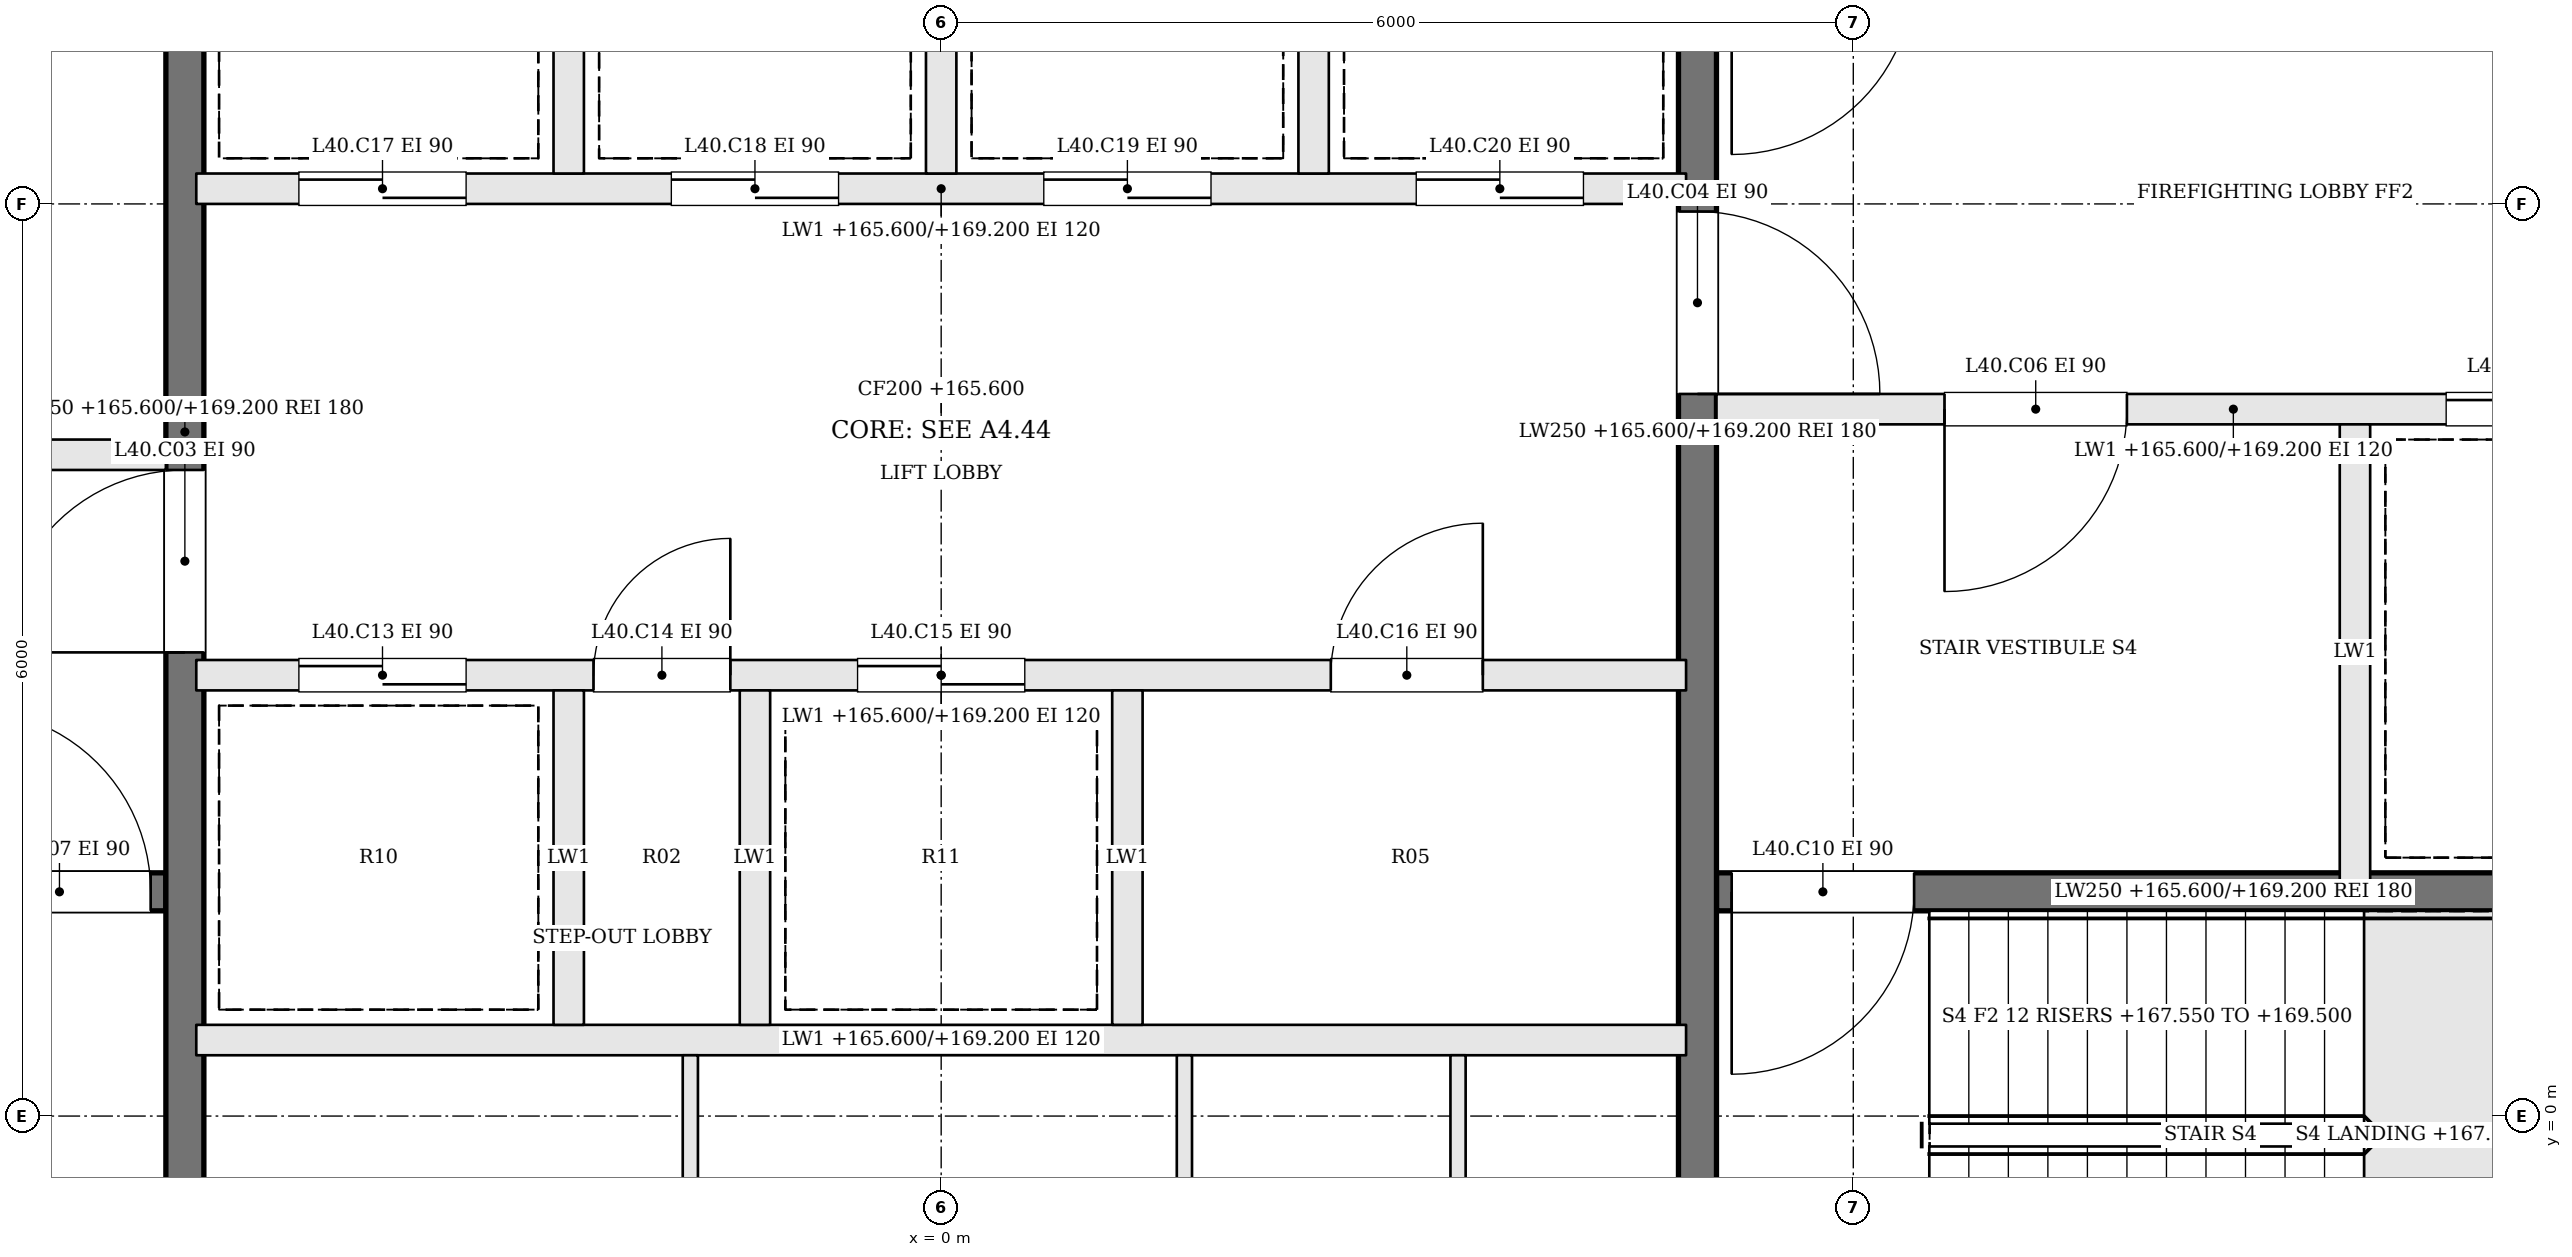
"""IFC4 building model, lengths in metres.
Left out: names, types, materials, properties, quantities, classifications, styles, units other than length and angle.
Written with IfcOpenShell. Run it as: python <this file> out.ifc"""

import sys

from ifc_helpers import new_model, si_unit, direction, frame, frame_2d, origin, place, context, subcontext, project, spatial, rectangle, extrude, element, fill, save


model = new_model("IFC4")
c1 = context("Model", 3, precision=1e-05, world=origin(), true_north=direction((0.0, 1.0)))
c2 = subcontext(c1, "Body", "Model", "MODEL_VIEW")
j1 = project(units=[si_unit("LENGTHUNIT", "METRE"), si_unit("PLANEANGLEUNIT", "RADIAN")], contexts=[c1])
p1 = place(None, origin())
s1 = spatial("IfcSite", under=j1, at=p1, CompositionType="ELEMENT")
p2 = place(p1, origin())
s2 = spatial("IfcBuilding", under=s1, at=p2, CompositionType="ELEMENT")
p3 = place(p2, frame((0.0, 0.0, 165.6)))
s3 = spatial("IfcBuildingStorey", under=s2, at=p3, CompositionType="ELEMENT", Elevation=165.6)
p4 = place(p3, frame((-11.9, 1.475, 0.0), z_axis=(0.0, 0.0, 1.0), x_axis=(1.0, 0.0, 0.0)))
e1 = element("IfcWall", 1, at=p4, inside=s3, PredefinedType="SOLIDWALL", context=c2, shape_type="SweptSolid", body=[
    extrude(rectangle(XDim=6.8, YDim=0.25, at=frame_2d((3.4, 0.0))), origin(), (0.0, 0.0, 1.0), 3.6),
])
p5 = place(p4, frame((5.5, 0.0, 0.0)))
e2 = element("IfcOpeningElement", 2, at=p5, cuts=e1, PredefinedType="OPENING", context=c2, shape_type="SweptSolid", body=[
    extrude(rectangle(XDim=1.2, YDim=2.1, at=frame_2d((0.6, 1.05))), frame((0.0, 0.135, 0.0), z_axis=(0.0, -1.0, 0.0), x_axis=(1.0, 0.0, 0.0)), (0.0, 0.0, 1.0), 0.27),
])
p6 = place(p3, frame((-11.9, 4.35, 0.0), z_axis=(0.0, 0.0, 1.0), x_axis=(1.0, 0.0, 0.0)))
e3 = element("IfcWall", 3, at=p6, inside=s3, PredefinedType="SOLIDWALL", context=c2, shape_type="SweptSolid", body=[
    extrude(rectangle(XDim=6.8, YDim=0.2, at=frame_2d((3.4, 0.0))), origin(), (0.0, 0.0, 1.0), 3.6),
])
p7 = place(p6, frame((4.1, 0.0, 0.0)))
e4 = element("IfcOpeningElement", 4, at=p7, cuts=e3, PredefinedType="OPENING", context=c2, shape_type="SweptSolid", body=[
    extrude(rectangle(XDim=1.2, YDim=2.1, at=frame_2d((0.6, 1.05))), frame((0.0, 0.11, 0.0), z_axis=(0.0, -1.0, 0.0), x_axis=(1.0, 0.0, 0.0)), (0.0, 0.0, 1.0), 0.22),
])
p8 = place(p6, frame((0.8, 0.0, 0.0)))
e5 = element("IfcOpeningElement", 5, at=p8, cuts=e3, PredefinedType="OPENING", context=c2, shape_type="SweptSolid", body=[
    extrude(rectangle(XDim=1.2, YDim=2.1, at=frame_2d((0.6, 1.05))), frame((0.0, 0.11, 0.0), z_axis=(0.0, -1.0, 0.0), x_axis=(1.0, 0.0, 0.0)), (0.0, 0.0, 1.0), 0.22),
])
p9 = place(p3, frame((11.9, 4.65, 0.0), z_axis=(0.0, 0.0, 1.0), x_axis=(-1.0, 0.0, 0.0)))
e6 = element("IfcWall", 6, at=p9, inside=s3, PredefinedType="SOLIDWALL", context=c2, shape_type="SweptSolid", body=[
    extrude(rectangle(XDim=6.8, YDim=0.2, at=frame_2d((3.4, 0.0))), origin(), (0.0, 0.0, 1.0), 3.6),
])
p10 = place(p9, frame((4.1, 0.0, 0.0)))
e7 = element("IfcOpeningElement", 7, at=p10, cuts=e6, PredefinedType="OPENING", context=c2, shape_type="SweptSolid", body=[
    extrude(rectangle(XDim=1.2, YDim=2.1, at=frame_2d((0.6, 1.05))), frame((0.0, 0.11, 0.0), z_axis=(0.0, -1.0, 0.0), x_axis=(1.0, 0.0, 0.0)), (0.0, 0.0, 1.0), 0.22),
])
p11 = place(p9, frame((0.8, 0.0, 0.0)))
e8 = element("IfcOpeningElement", 8, at=p11, cuts=e6, PredefinedType="OPENING", context=c2, shape_type="SweptSolid", body=[
    extrude(rectangle(XDim=1.2, YDim=2.1, at=frame_2d((0.6, 1.05))), frame((0.0, 0.11, 0.0), z_axis=(0.0, -1.0, 0.0), x_axis=(1.0, 0.0, 0.0)), (0.0, 0.0, 1.0), 0.22),
])
p12 = place(p3, frame((11.9, 1.475, 0.0), z_axis=(0.0, 0.0, 1.0), x_axis=(-1.0, 0.0, 0.0)))
e9 = element("IfcWall", 9, at=p12, inside=s3, PredefinedType="SOLIDWALL", context=c2, shape_type="SweptSolid", body=[
    extrude(rectangle(XDim=6.8, YDim=0.25, at=frame_2d((3.4, 0.0))), origin(), (0.0, 0.0, 1.0), 3.6),
])
p13 = place(p12, frame((5.5, 0.0, 0.0)))
e10 = element("IfcOpeningElement", 10, at=p13, cuts=e9, PredefinedType="OPENING", context=c2, shape_type="SweptSolid", body=[
    extrude(rectangle(XDim=1.2, YDim=2.1, at=frame_2d((0.6, 1.05))), frame((0.0, 0.135, 0.0), z_axis=(0.0, -1.0, 0.0), x_axis=(1.0, 0.0, 0.0)), (0.0, 0.0, 1.0), 0.27),
])
p14 = place(p3, frame((9.3, 4.55, 0.0), z_axis=(0.0, 0.0, 1.0), x_axis=(0.0, -1.0, 0.0)))
e11 = element("IfcWall", 11, at=p14, inside=s3, PredefinedType="SOLIDWALL", context=c2, shape_type="SweptSolid", body=[
    extrude(rectangle(XDim=3.0, YDim=0.2, at=frame_2d((1.5, 0.0))), origin(), (0.0, 0.0, 1.0), 3.6),
])
p15 = place(p3, frame((-4.975, -1.9, 0.0), z_axis=(0.0, 0.0, 1.0), x_axis=(0.0, 1.0, 0.0)))
e12 = element("IfcWall", 12, at=p15, inside=s3, PredefinedType="SOLIDWALL", context=c2, shape_type="SweptSolid", body=[
    extrude(rectangle(XDim=12.8, YDim=0.25, at=frame_2d((6.4, 0.0))), origin(), (0.0, 0.0, 1.0), 3.6),
])
p16 = place(p15, frame((4.95, 0.0, 0.0)))
e13 = element("IfcOpeningElement", 13, at=p16, cuts=e12, PredefinedType="OPENING", context=c2, shape_type="SweptSolid", body=[
    extrude(rectangle(XDim=1.2, YDim=2.1, at=frame_2d((0.6, 1.05))), frame((0.0, 0.135, 0.0), z_axis=(0.0, -1.0, 0.0), x_axis=(1.0, 0.0, 0.0)), (0.0, 0.0, 1.0), 0.27),
])
p17 = place(p3, frame((4.975, 10.9, 0.0), z_axis=(0.0, 0.0, 1.0), x_axis=(0.0, -1.0, 0.0)))
e14 = element("IfcWall", 14, at=p17, inside=s3, PredefinedType="SOLIDWALL", context=c2, shape_type="SweptSolid", body=[
    extrude(rectangle(XDim=12.8, YDim=0.25, at=frame_2d((6.4, 0.0))), origin(), (0.0, 0.0, 1.0), 3.6),
])
p18 = place(p17, frame((4.95, 0.0, 0.0)))
e15 = element("IfcOpeningElement", 15, at=p18, cuts=e14, PredefinedType="OPENING", context=c2, shape_type="SweptSolid", body=[
    extrude(rectangle(XDim=1.2, YDim=2.1, at=frame_2d((0.6, 1.05))), frame((0.0, 0.135, 0.0), z_axis=(0.0, -1.0, 0.0), x_axis=(1.0, 0.0, 0.0)), (0.0, 0.0, 1.0), 0.27),
])
p19 = place(p3, frame((-4.9, 0.5, 0.0), z_axis=(0.0, 0.0, 1.0), x_axis=(1.0, 0.0, 0.0)))
e16 = element("IfcWall", 16, at=p19, inside=s3, PredefinedType="SOLIDWALL", context=c2, shape_type="SweptSolid", body=[
    extrude(rectangle(XDim=9.8, YDim=0.2, at=frame_2d((4.9, 0.0))), origin(), (0.0, 0.0, 1.0), 3.6),
])
p20 = place(p3, frame((-4.9, 2.9, 0.0), z_axis=(0.0, 0.0, 1.0), x_axis=(1.0, 0.0, 0.0)))
e17 = element("IfcWall", 17, at=p20, inside=s3, PredefinedType="SOLIDWALL", context=c2, shape_type="SweptSolid", body=[
    extrude(rectangle(XDim=9.8, YDim=0.2, at=frame_2d((4.9, 0.0))), origin(), (0.0, 0.0, 1.0), 3.6),
])
p21 = place(p20, frame((0.675, 0.0, 0.0)))
e18 = element("IfcOpeningElement", 18, at=p21, cuts=e17, PredefinedType="OPENING", context=c2, shape_type="SweptSolid", body=[
    extrude(rectangle(XDim=1.1, YDim=2.1, at=frame_2d((0.55, 1.05))), frame((0.0, 0.11, 0.0), z_axis=(0.0, -1.0, 0.0), x_axis=(1.0, 0.0, 0.0)), (0.0, 0.0, 1.0), 0.22),
])
p22 = place(p20, frame((2.613, 0.0, 0.0)))
e19 = element("IfcOpeningElement", 19, at=p22, cuts=e17, PredefinedType="OPENING", context=c2, shape_type="SweptSolid", body=[
    extrude(rectangle(XDim=0.9, YDim=2.1, at=frame_2d((0.45, 1.05))), frame((0.0, 0.11, 0.0), z_axis=(0.0, -1.0, 0.0), x_axis=(1.0, 0.0, 0.0)), (0.0, 0.0, 1.0), 0.22),
])
p23 = place(p20, frame((4.35, 0.0, 0.0)))
e20 = element("IfcOpeningElement", 20, at=p23, cuts=e17, PredefinedType="OPENING", context=c2, shape_type="SweptSolid", body=[
    extrude(rectangle(XDim=1.1, YDim=2.1, at=frame_2d((0.55, 1.05))), frame((0.0, 0.11, 0.0), z_axis=(0.0, -1.0, 0.0), x_axis=(1.0, 0.0, 0.0)), (0.0, 0.0, 1.0), 0.22),
])
p24 = place(p20, frame((7.463, 0.0, 0.0)))
e21 = element("IfcOpeningElement", 21, at=p24, cuts=e17, PredefinedType="OPENING", context=c2, shape_type="SweptSolid", body=[
    extrude(rectangle(XDim=1.0, YDim=2.1, at=frame_2d((0.5, 1.05))), frame((0.0, 0.11, 0.0), z_axis=(0.0, -1.0, 0.0), x_axis=(1.0, 0.0, 0.0)), (0.0, 0.0, 1.0), 0.22),
])
p25 = place(p3, frame((-4.9, 6.1, 0.0), z_axis=(0.0, 0.0, 1.0), x_axis=(1.0, 0.0, 0.0)))
e22 = element("IfcWall", 22, at=p25, inside=s3, PredefinedType="SOLIDWALL", context=c2, shape_type="SweptSolid", body=[
    extrude(rectangle(XDim=9.8, YDim=0.2, at=frame_2d((4.9, 0.0))), origin(), (0.0, 0.0, 1.0), 3.6),
])
p26 = place(p25, frame((0.675, 0.0, 0.0)))
e23 = element("IfcOpeningElement", 23, at=p26, cuts=e22, PredefinedType="OPENING", context=c2, shape_type="SweptSolid", body=[
    extrude(rectangle(XDim=1.1, YDim=2.1, at=frame_2d((0.55, 1.05))), frame((0.0, 0.11, 0.0), z_axis=(0.0, -1.0, 0.0), x_axis=(1.0, 0.0, 0.0)), (0.0, 0.0, 1.0), 0.22),
])
p27 = place(p25, frame((3.125, 0.0, 0.0)))
e24 = element("IfcOpeningElement", 24, at=p27, cuts=e22, PredefinedType="OPENING", context=c2, shape_type="SweptSolid", body=[
    extrude(rectangle(XDim=1.1, YDim=2.1, at=frame_2d((0.55, 1.05))), frame((0.0, 0.11, 0.0), z_axis=(0.0, -1.0, 0.0), x_axis=(1.0, 0.0, 0.0)), (0.0, 0.0, 1.0), 0.22),
])
p28 = place(p25, frame((5.575, 0.0, 0.0)))
e25 = element("IfcOpeningElement", 25, at=p28, cuts=e22, PredefinedType="OPENING", context=c2, shape_type="SweptSolid", body=[
    extrude(rectangle(XDim=1.1, YDim=2.1, at=frame_2d((0.55, 1.05))), frame((0.0, 0.11, 0.0), z_axis=(0.0, -1.0, 0.0), x_axis=(1.0, 0.0, 0.0)), (0.0, 0.0, 1.0), 0.22),
])
p29 = place(p25, frame((8.025, 0.0, 0.0)))
e26 = element("IfcOpeningElement", 26, at=p29, cuts=e22, PredefinedType="OPENING", context=c2, shape_type="SweptSolid", body=[
    extrude(rectangle(XDim=1.1, YDim=2.1, at=frame_2d((0.55, 1.05))), frame((0.0, 0.11, 0.0), z_axis=(0.0, -1.0, 0.0), x_axis=(1.0, 0.0, 0.0)), (0.0, 0.0, 1.0), 0.22),
])
for number, where, z_axis, x_axis in (
    (27, (-2.45, 0.6, 0.0), (0.0, 0.0, 1.0), (0.0, 1.0, 0.0)),
    (28, (-1.225, 0.6, 0.0), (0.0, 0.0, 1.0), (0.0, 1.0, 0.0)),
    (29, (1.225, 0.6, 0.0), (0.0, 0.0, 1.0), (0.0, 1.0, 0.0)),
    (30, (-2.45, 6.2, 0.0), (0.0, 0.0, 1.0), (0.0, 1.0, 0.0)),
    (31, (0.0, 6.2, 0.0), (0.0, 0.0, 1.0), (0.0, 1.0, 0.0)),
    (32, (2.45, 6.2, 0.0), (0.0, 0.0, 1.0), (0.0, 1.0, 0.0)),
):
    element("IfcWall", number, at=place(p3, frame(where, z_axis=z_axis, x_axis=x_axis)), inside=s3, PredefinedType="SOLIDWALL", context=c2, shape_type="SweptSolid", body=[
        extrude(rectangle(XDim=2.2, YDim=0.2, at=frame_2d((1.1, 0.0))), origin(), (0.0, 0.0, 1.0), 3.6),
    ])
for number, where, z_axis, x_axis in (
    (33, (-1.65, -1.9, 0.0), (0.0, 0.0, 1.0), (0.0, 1.0, 0.0)),
    (34, (1.6, -1.9, 0.0), (0.0, 0.0, 1.0), (0.0, 1.0, 0.0)),
    (35, (3.4, -1.9, 0.0), (0.0, 0.0, 1.0), (0.0, 1.0, 0.0)),
):
    element("IfcWall", number, at=place(p3, frame(where, z_axis=z_axis, x_axis=x_axis)), inside=s3, PredefinedType="PARTITIONING", context=c2, shape_type="SweptSolid", body=[
        extrude(rectangle(XDim=2.3, YDim=0.1, at=frame_2d((1.15, 0.0))), origin(), (0.0, 0.0, 1.0), 3.6),
    ])
p30 = place(p16, origin())
e36 = element("IfcDoor", 36, at=p30, inside=s3, OperationType="SINGLE_SWING_LEFT", PredefinedType="DOOR", context=c2, shape_type="SweptSolid", body=[
    extrude(rectangle(XDim=1.2, YDim=2.1, at=frame_2d((0.6, 1.05))), frame((0.0, 0.025, 0.0), z_axis=(0.0, -1.0, 0.0), x_axis=(1.0, 0.0, 0.0)), (0.0, 0.0, 1.0), 0.05),
])
fill(e13, e36)
p31 = place(p18, origin())
e37 = element("IfcDoor", 37, at=p31, inside=s3, OperationType="SINGLE_SWING_RIGHT", PredefinedType="DOOR", context=c2, shape_type="SweptSolid", body=[
    extrude(rectangle(XDim=1.2, YDim=2.1, at=frame_2d((0.6, 1.05))), frame((0.0, 0.025, 0.0), z_axis=(0.0, -1.0, 0.0), x_axis=(1.0, 0.0, 0.0)), (0.0, 0.0, 1.0), 0.05),
])
fill(e15, e37)
p32 = place(p10, origin())
e38 = element("IfcDoor", 38, at=p32, inside=s3, OperationType="SINGLE_SWING_RIGHT", PredefinedType="DOOR", context=c2, shape_type="SweptSolid", body=[
    extrude(rectangle(XDim=1.2, YDim=2.1, at=frame_2d((0.6, 1.05))), frame((0.0, 0.025, 0.0), z_axis=(0.0, -1.0, 0.0), x_axis=(1.0, 0.0, 0.0)), (0.0, 0.0, 1.0), 0.05),
])
fill(e7, e38)
p33 = place(p5, origin())
e39 = element("IfcDoor", 39, at=p33, inside=s3, OperationType="SINGLE_SWING_LEFT", PredefinedType="DOOR", context=c2, shape_type="SweptSolid", body=[
    extrude(rectangle(XDim=1.2, YDim=2.1, at=frame_2d((0.6, 1.05))), frame((0.0, 0.025, 0.0), z_axis=(0.0, -1.0, 0.0), x_axis=(1.0, 0.0, 0.0)), (0.0, 0.0, 1.0), 0.05),
])
fill(e2, e39)
p34 = place(p13, origin())
e40 = element("IfcDoor", 40, at=p34, inside=s3, OperationType="SINGLE_SWING_RIGHT", PredefinedType="DOOR", context=c2, shape_type="SweptSolid", body=[
    extrude(rectangle(XDim=1.2, YDim=2.1, at=frame_2d((0.6, 1.05))), frame((0.0, 0.025, 0.0), z_axis=(0.0, -1.0, 0.0), x_axis=(1.0, 0.0, 0.0)), (0.0, 0.0, 1.0), 0.05),
])
fill(e10, e40)
p35 = place(p11, origin())
e41 = element("IfcDoor", 41, at=p35, inside=s3, OperationType="SLIDING_TO_RIGHT", PredefinedType="DOOR", context=c2, shape_type="SweptSolid", body=[
    extrude(rectangle(XDim=1.2, YDim=2.1, at=frame_2d((0.6, 1.05))), frame((0.0, 0.025, 0.0), z_axis=(0.0, -1.0, 0.0), x_axis=(1.0, 0.0, 0.0)), (0.0, 0.0, 1.0), 0.05),
])
fill(e8, e41)
p36 = place(p21, origin())
e42 = element("IfcDoor", 42, at=p36, inside=s3, OperationType="SLIDING_TO_RIGHT", PredefinedType="DOOR", context=c2, shape_type="SweptSolid", body=[
    extrude(rectangle(XDim=1.1, YDim=2.1, at=frame_2d((0.55, 1.05))), frame((0.0, 0.025, 0.0), z_axis=(0.0, -1.0, 0.0), x_axis=(1.0, 0.0, 0.0)), (0.0, 0.0, 1.0), 0.05),
])
fill(e18, e42)
p37 = place(p22, origin())
e43 = element("IfcDoor", 43, at=p37, inside=s3, OperationType="SINGLE_SWING_RIGHT", PredefinedType="DOOR", context=c2, shape_type="SweptSolid", body=[
    extrude(rectangle(XDim=0.9, YDim=2.1, at=frame_2d((0.45, 1.05))), frame((0.0, 0.025, 0.0), z_axis=(0.0, -1.0, 0.0), x_axis=(1.0, 0.0, 0.0)), (0.0, 0.0, 1.0), 0.05),
])
fill(e19, e43)
p38 = place(p23, origin())
e44 = element("IfcDoor", 44, at=p38, inside=s3, OperationType="SLIDING_TO_LEFT", PredefinedType="DOOR", context=c2, shape_type="SweptSolid", body=[
    extrude(rectangle(XDim=1.1, YDim=2.1, at=frame_2d((0.55, 1.05))), frame((0.0, 0.025, 0.0), z_axis=(0.0, -1.0, 0.0), x_axis=(1.0, 0.0, 0.0)), (0.0, 0.0, 1.0), 0.05),
])
fill(e20, e44)
p39 = place(p24, origin())
e45 = element("IfcDoor", 45, at=p39, inside=s3, OperationType="SINGLE_SWING_RIGHT", PredefinedType="DOOR", context=c2, shape_type="SweptSolid", body=[
    extrude(rectangle(XDim=1.0, YDim=2.1, at=frame_2d((0.5, 1.05))), frame((0.0, 0.025, 0.0), z_axis=(0.0, -1.0, 0.0), x_axis=(1.0, 0.0, 0.0)), (0.0, 0.0, 1.0), 0.05),
])
fill(e21, e45)
p40 = place(p26, origin())
e46 = element("IfcDoor", 46, at=p40, inside=s3, OperationType="SLIDING_TO_RIGHT", PredefinedType="DOOR", context=c2, shape_type="SweptSolid", body=[
    extrude(rectangle(XDim=1.1, YDim=2.1, at=frame_2d((0.55, 1.05))), frame((0.0, 0.025, 0.0), z_axis=(0.0, -1.0, 0.0), x_axis=(1.0, 0.0, 0.0)), (0.0, 0.0, 1.0), 0.05),
])
fill(e23, e46)
p41 = place(p27, origin())
e47 = element("IfcDoor", 47, at=p41, inside=s3, OperationType="SLIDING_TO_LEFT", PredefinedType="DOOR", context=c2, shape_type="SweptSolid", body=[
    extrude(rectangle(XDim=1.1, YDim=2.1, at=frame_2d((0.55, 1.05))), frame((0.0, 0.025, 0.0), z_axis=(0.0, -1.0, 0.0), x_axis=(1.0, 0.0, 0.0)), (0.0, 0.0, 1.0), 0.05),
])
fill(e24, e47)
p42 = place(p28, origin())
e48 = element("IfcDoor", 48, at=p42, inside=s3, OperationType="SLIDING_TO_RIGHT", PredefinedType="DOOR", context=c2, shape_type="SweptSolid", body=[
    extrude(rectangle(XDim=1.1, YDim=2.1, at=frame_2d((0.55, 1.05))), frame((0.0, 0.025, 0.0), z_axis=(0.0, -1.0, 0.0), x_axis=(1.0, 0.0, 0.0)), (0.0, 0.0, 1.0), 0.05),
])
fill(e25, e48)
p43 = place(p29, origin())
e49 = element("IfcDoor", 49, at=p43, inside=s3, OperationType="SLIDING_TO_LEFT", PredefinedType="DOOR", context=c2, shape_type="SweptSolid", body=[
    extrude(rectangle(XDim=1.1, YDim=2.1, at=frame_2d((0.55, 1.05))), frame((0.0, 0.025, 0.0), z_axis=(0.0, -1.0, 0.0), x_axis=(1.0, 0.0, 0.0)), (0.0, 0.0, 1.0), 0.05),
])
fill(e26, e49)
save(model, sys.argv[1])
